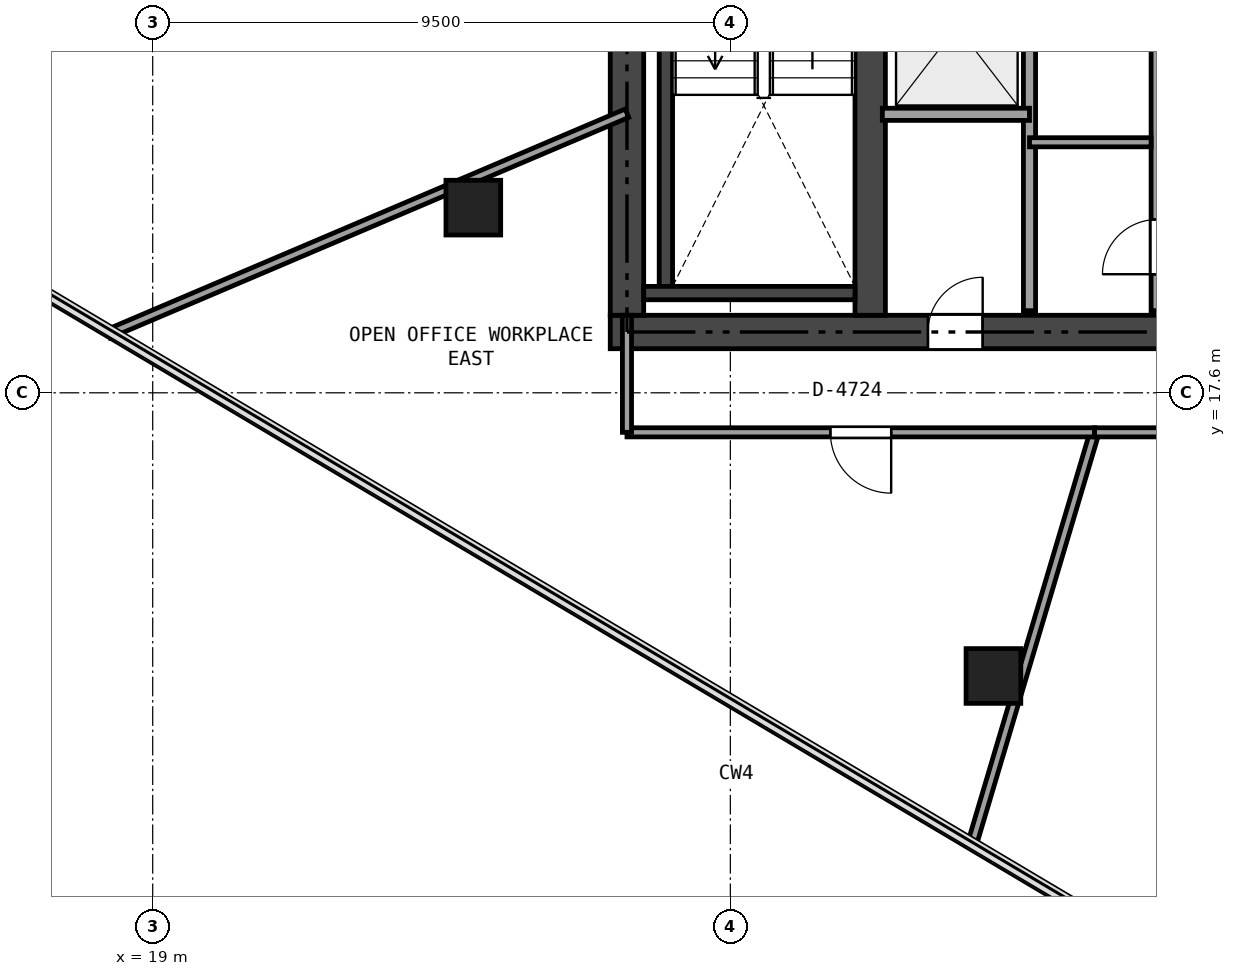
"""IFC4 building model, lengths in metres.
Left out: names, types, materials, properties, quantities, classifications, styles, units other than length and angle.
Written with IfcOpenShell. Run it as: python <this file> out.ifc"""

import sys

from ifc_helpers import new_model, si_unit, direction, frame, frame_2d, origin, origin_2d, place, context, subcontext, project, spatial, rectangle, extrude, element, fill, save


model = new_model("IFC4")
c1 = context("Model", 3, precision=1e-05, world=origin(), true_north=direction((0.0, 1.0)))
c2 = subcontext(c1, "Body", "Model", "MODEL_VIEW")
j1 = project(units=[si_unit("LENGTHUNIT", "METRE"), si_unit("PLANEANGLEUNIT", "RADIAN")], contexts=[c1])
p1 = place(None, origin())
s1 = spatial("IfcSite", under=j1, at=p1, CompositionType="ELEMENT")
p2 = place(p1, origin())
s2 = spatial("IfcBuilding", under=s1, at=p2, CompositionType="ELEMENT")
p3 = place(p2, frame((0.0, 0.0, 177.0)))
s3 = spatial("IfcBuildingStorey", under=s2, at=p3, CompositionType="ELEMENT", Elevation=177.0)
p4 = place(p3, frame((26.525, 18.6, 0.0), z_axis=(0.0, 0.0, 1.0), x_axis=(1.0, 0.0, 0.0)))
e1 = element("IfcWall", 1, at=p4, inside=s3, PredefinedType="SHEAR", context=c2, shape_type="SweptSolid", body=[
    extrude(rectangle(XDim=21.35, YDim=0.55, at=frame_2d((10.675, 0.0))), origin(), (0.0, 0.0, 1.0), 3.32),
])
p5 = place(p4, frame((12.4, 0.0, 0.0)))
e2 = element("IfcOpeningElement", 2, at=p5, cuts=e1, PredefinedType="OPENING", context=c2, shape_type="SweptSolid", body=[
    extrude(rectangle(XDim=1.15, YDim=2.15, at=frame_2d((0.575, 1.075))), frame((0.0, 0.285, 0.0), z_axis=(0.0, -1.0, 0.0), x_axis=(1.0, 0.0, 0.0)), (0.0, 0.0, 1.0), 0.57),
])
p6 = place(p4, frame((5.225, 0.0, 0.0)))
e3 = element("IfcOpeningElement", 3, at=p6, cuts=e1, PredefinedType="OPENING", context=c2, shape_type="SweptSolid", body=[
    extrude(rectangle(XDim=0.9, YDim=2.1, at=frame_2d((0.45, 1.05))), frame((0.0, 0.285, 0.0), z_axis=(0.0, -1.0, 0.0), x_axis=(1.0, 0.0, 0.0)), (0.0, 0.0, 1.0), 0.57),
])
p7 = place(p3, frame((26.8, 18.875, 0.0), z_axis=(0.0, 0.0, 1.0), x_axis=(0.0, 1.0, 0.0)))
e4 = element("IfcWall", 4, at=p7, inside=s3, PredefinedType="SHEAR", context=c2, shape_type="SweptSolid", body=[
    extrude(rectangle(XDim=15.05, YDim=0.55, at=frame_2d((7.525, 0.0))), origin(), (0.0, 0.0, 1.0), 3.32),
])
p8 = place(p3, frame((30.8, 18.875, 0.0), z_axis=(0.0, 0.0, 1.0), x_axis=(0.0, 1.0, 0.0)))
e5 = element("IfcWall", 5, at=p8, inside=s3, PredefinedType="SHEAR", context=c2, shape_type="SweptSolid", body=[
    extrude(rectangle(XDim=15.05, YDim=0.5, at=frame_2d((7.525, 0.0))), origin(), (0.0, 0.0, 1.0), 3.32),
])
p9 = place(p8, frame((6.625, 0.0, 0.0)))
e6 = element("IfcOpeningElement", 6, at=p9, cuts=e5, PredefinedType="OPENING", context=c2, shape_type="SweptSolid", body=[
    extrude(rectangle(XDim=1.1, YDim=2.15, at=frame_2d((0.55, 1.075))), frame((0.0, 0.26, 0.0), z_axis=(0.0, -1.0, 0.0), x_axis=(1.0, 0.0, 0.0)), (0.0, 0.0, 1.0), 0.52),
])
p10 = place(p8, frame((8.425, 0.0, 0.0)))
e7 = element("IfcOpeningElement", 7, at=p10, cuts=e5, PredefinedType="OPENING", context=c2, shape_type="SweptSolid", body=[
    extrude(rectangle(XDim=0.9, YDim=2.1, at=frame_2d((0.45, 1.05))), frame((0.0, 0.26, 0.0), z_axis=(0.0, -1.0, 0.0), x_axis=(1.0, 0.0, 0.0)), (0.0, 0.0, 1.0), 0.52),
])
p11 = place(p3, frame((27.44, 19.35, 0.0), z_axis=(0.0, 0.0, 1.0), x_axis=(0.0, 1.0, 0.0)))
e8 = element("IfcWall", 8, at=p11, inside=s3, PredefinedType="SHEAR", context=c2, shape_type="SweptSolid", body=[
    extrude(rectangle(XDim=7.4, YDim=0.22, at=frame_2d((3.7, 0.0))), origin(), (0.0, 0.0, 1.0), 3.32),
])
p12 = place(p3, frame((27.075, 19.24, 0.0), z_axis=(0.0, 0.0, 1.0), x_axis=(1.0, 0.0, 0.0)))
e9 = element("IfcWall", 9, at=p12, inside=s3, PredefinedType="SHEAR", context=c2, shape_type="SweptSolid", body=[
    extrude(rectangle(XDim=3.475, YDim=0.22, at=frame_2d((1.738, 0.0))), origin(), (0.0, 0.0, 1.0), 3.32),
])
for number, where, z_axis, x_axis in (
    (10, (24.273, 20.645, -0.405), (0.0, 0.0, 1.0), (1.0, 0.0, 0.0)),
    (11, (32.827, 12.943, -0.405), (0.0, 0.0, 1.0), (1.0, 0.0, 0.0)),
):
    element("IfcColumn", number, at=place(p3, frame(where, z_axis=z_axis, x_axis=x_axis)), inside=s3, PredefinedType="COLUMN", context=c2, shape_type="SweptSolid", body=[
        extrude(rectangle(XDim=0.9, YDim=0.9, at=origin_2d()), origin(), (0.0, 0.0, 1.0), 3.725),
    ])
p13 = place(p3, frame((35.52, 18.95, 0.0), z_axis=(0.0, 0.0, 1.0), x_axis=(0.0, 1.0, 0.0)))
e12 = element("IfcWall", 12, at=p13, inside=s3, PredefinedType="SOLIDWALL", context=c2, shape_type="SweptSolid", body=[
    extrude(rectangle(XDim=14.9, YDim=0.2, at=frame_2d((7.45, 0.0))), origin(), (0.0, 0.0, 1.0), 2.841),
])
p14 = place(p13, frame((7.755, 0.0, 0.0)))
e13 = element("IfcOpeningElement", 13, at=p14, cuts=e12, PredefinedType="OPENING", context=c2, shape_type="SweptSolid", body=[
    extrude(rectangle(XDim=0.95, YDim=2.15, at=frame_2d((0.475, 1.075))), frame((0.0, 0.11, 0.0), z_axis=(0.0, -1.0, 0.0), x_axis=(1.0, 0.0, 0.0)), (0.0, 0.0, 1.0), 0.22),
])
p15 = place(p13, frame((0.6, 0.0, 0.0)))
e14 = element("IfcOpeningElement", 14, at=p15, cuts=e12, PredefinedType="OPENING", context=c2, shape_type="SweptSolid", body=[
    extrude(rectangle(XDim=0.9, YDim=2.1, at=frame_2d((0.45, 1.05))), frame((0.0, 0.11, 0.0), z_axis=(0.0, -1.0, 0.0), x_axis=(1.0, 0.0, 0.0)), (0.0, 0.0, 1.0), 0.22),
])
p16 = place(p3, frame((33.42, 18.95, 0.0), z_axis=(0.0, 0.0, 1.0), x_axis=(0.0, 1.0, 0.0)))
e15 = element("IfcWall", 15, at=p16, inside=s3, PredefinedType="SOLIDWALL", context=c2, shape_type="SweptSolid", body=[
    extrude(rectangle(XDim=6.13, YDim=0.2, at=frame_2d((3.065, 0.0))), origin(), (0.0, 0.0, 1.0), 2.841),
])
p17 = place(p3, frame((31.0, 22.18, 0.0), z_axis=(0.0, 0.0, 1.0), x_axis=(1.0, 0.0, 0.0)))
e16 = element("IfcWall", 16, at=p17, inside=s3, PredefinedType="SOLIDWALL", context=c2, shape_type="SweptSolid", body=[
    extrude(rectangle(XDim=2.42, YDim=0.2, at=frame_2d((1.21, 0.0))), origin(), (0.0, 0.0, 1.0), 3.32),
])
p18 = place(p3, frame((33.42, 21.72, 0.0), z_axis=(0.0, 0.0, 1.0), x_axis=(1.0, 0.0, 0.0)))
e17 = element("IfcWall", 17, at=p18, inside=s3, PredefinedType="PARTITIONING", context=c2, shape_type="SweptSolid", body=[
    extrude(rectangle(XDim=2.0, YDim=0.15, at=frame_2d((1.0, 0.0))), origin(), (0.0, 0.0, 1.0), 3.32),
])
p19 = place(p3, frame((18.271, 18.57, 0.0), z_axis=(0.0, 0.0, 1.0), x_axis=(0.92021116407, 0.391422295637, 0.0)))
e18 = element("IfcWall", 18, at=p19, inside=s3, PredefinedType="PARTITIONING", context=c2, shape_type="SweptSolid", body=[
    extrude(rectangle(XDim=9.269, YDim=0.15, at=frame_2d((4.634, 0.0))), origin(), (0.0, 0.0, 1.0), 2.905),
])
p20 = place(p3, frame((32.466, 10.15, 0.0), z_axis=(0.0, 0.0, 1.0), x_axis=(0.285266765974, 0.958448158343, 0.0)))
e19 = element("IfcWall", 19, at=p20, inside=s3, PredefinedType="PARTITIONING", context=c2, shape_type="SweptSolid", body=[
    extrude(rectangle(XDim=7.095, YDim=0.15, at=frame_2d((3.547, 0.0))), origin(), (0.0, 0.0, 1.0), 2.905),
])
p21 = place(p3, frame((34.49, 16.95, 0.0), z_axis=(0.0, 0.0, 1.0), x_axis=(-1.0, 0.0, 0.0)))
e20 = element("IfcWall", 20, at=p21, inside=s3, PredefinedType="PARTITIONING", context=c2, shape_type="SweptSolid", body=[
    extrude(rectangle(XDim=7.69, YDim=0.15, at=frame_2d((3.845, 0.0))), origin(), (0.0, 0.0, 1.0), 2.697),
])
p22 = place(p21, frame((3.345, 0.0, 0.0)))
e21 = element("IfcOpeningElement", 21, at=p22, cuts=e20, PredefinedType="OPENING", context=c2, shape_type="SweptSolid", body=[
    extrude(rectangle(XDim=1.0, YDim=2.15, at=frame_2d((0.5, 1.075))), frame((0.0, 0.085, 0.0), z_axis=(0.0, -1.0, 0.0), x_axis=(1.0, 0.0, 0.0)), (0.0, 0.0, 1.0), 0.17),
])
p23 = place(p3, frame((26.8, 16.95, 0.0), z_axis=(0.0, 0.0, 1.0), x_axis=(0.0, 1.0, 0.0)))
e22 = element("IfcWall", 22, at=p23, inside=s3, PredefinedType="PARTITIONING", context=c2, shape_type="SweptSolid", body=[
    extrude(rectangle(XDim=1.925, YDim=0.15, at=frame_2d((0.962, 0.0))), origin(), (0.0, 0.0, 1.0), 2.905),
])
p24 = place(p3, frame((44.583, 16.95, 0.0), z_axis=(0.0, 0.0, 1.0), x_axis=(-1.0, 0.0, 0.0)))
e23 = element("IfcWall", 23, at=p24, inside=s3, PredefinedType="PARTITIONING", context=c2, shape_type="SweptSolid", body=[
    extrude(rectangle(XDim=10.093, YDim=0.15, at=frame_2d((5.046, 0.0))), origin(), (0.0, 0.0, 1.0), 2.697),
])
p25 = place(p24, frame((4.546, 0.0, 0.0)))
e24 = element("IfcOpeningElement", 24, at=p25, cuts=e23, PredefinedType="OPENING", context=c2, shape_type="SweptSolid", body=[
    extrude(rectangle(XDim=1.0, YDim=2.15, at=frame_2d((0.5, 1.075))), frame((0.0, 0.085, 0.0), z_axis=(0.0, -1.0, 0.0), x_axis=(1.0, 0.0, 0.0)), (0.0, 0.0, 1.0), 0.17),
])
p26 = place(p6, origin())
e25 = element("IfcDoor", 25, at=p26, inside=s3, OperationType="SINGLE_SWING_RIGHT", PredefinedType="DOOR", context=c2, shape_type="SweptSolid", body=[
    extrude(rectangle(XDim=0.9, YDim=2.1, at=frame_2d((0.45, 1.05))), frame((0.0, 0.025, 0.0), z_axis=(0.0, -1.0, 0.0), x_axis=(1.0, 0.0, 0.0)), (0.0, 0.0, 1.0), 0.05),
])
fill(e3, e25)
p27 = place(p22, origin())
e26 = element("IfcDoor", 26, at=p27, inside=s3, OperationType="SINGLE_SWING_LEFT", PredefinedType="DOOR", context=c2, shape_type="SweptSolid", body=[
    extrude(rectangle(XDim=1.0, YDim=2.15, at=frame_2d((0.5, 1.075))), frame((0.0, 0.025, 0.0), z_axis=(0.0, -1.0, 0.0), x_axis=(1.0, 0.0, 0.0)), (0.0, 0.0, 1.0), 0.05),
])
fill(e21, e26)
save(model, sys.argv[1])
